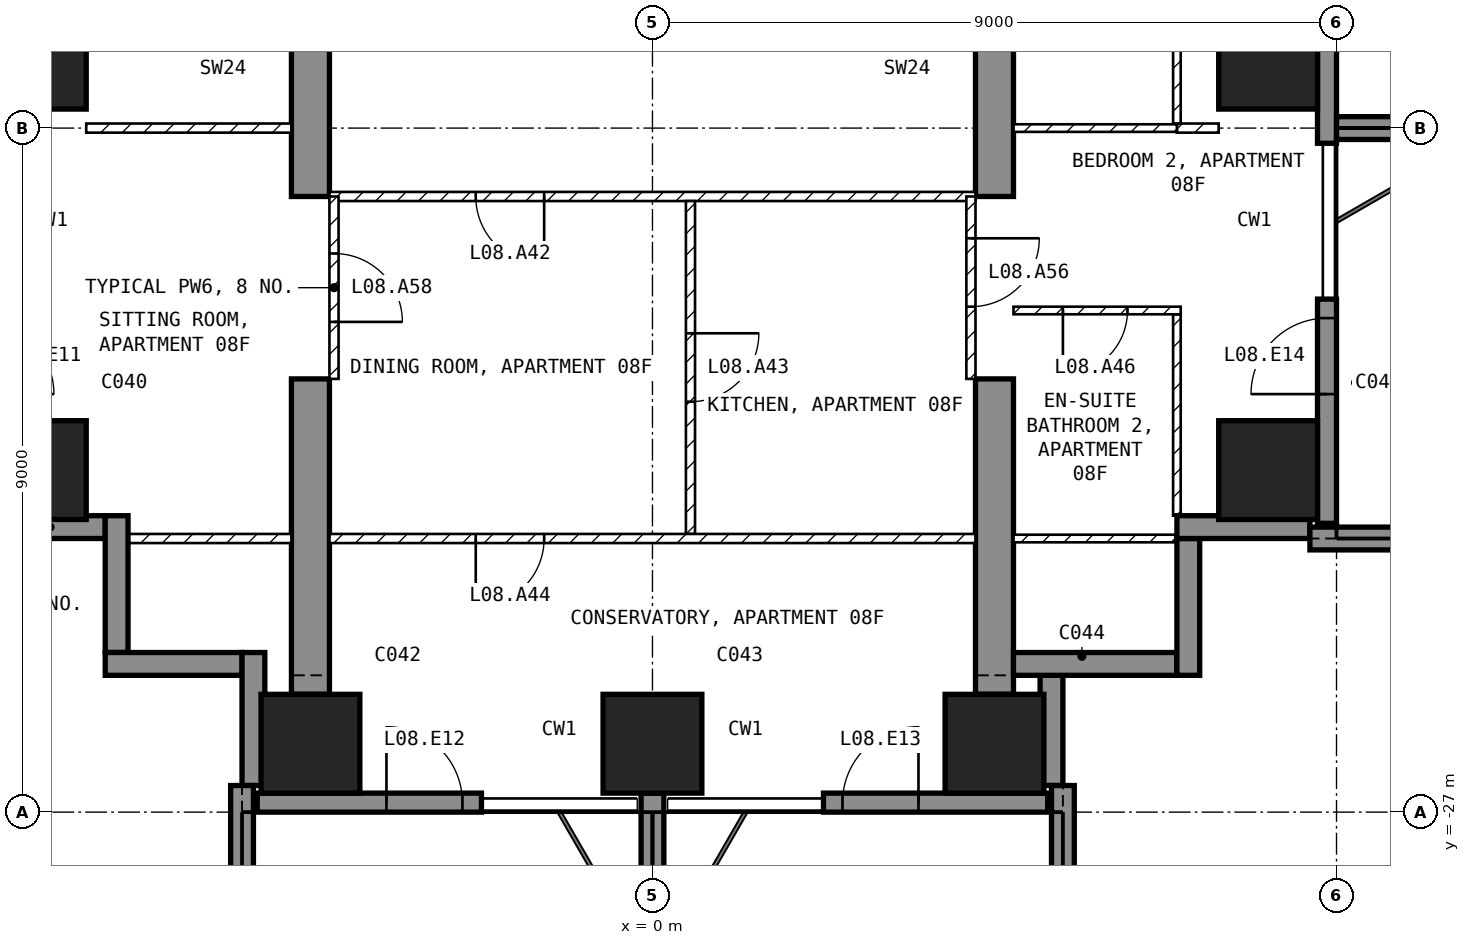
"""IFC4 building model, lengths in metres.
Left out: names, types, materials, properties, quantities, classifications, styles, units other than length and angle.
Written with IfcOpenShell. Run it as: python <this file> out.ifc"""

import sys

from ifc_helpers import new_model, si_unit, direction, frame, frame_2d, origin, origin_2d, place, context, subcontext, project, spatial, polyline, rectangle, outline, extrude, element, fill, save


model = new_model("IFC4")
c1 = context("Model", 3, precision=1e-05, world=origin(), true_north=direction((0.0, 1.0)))
c2 = subcontext(c1, "Body", "Model", "MODEL_VIEW")
j1 = project(units=[si_unit("LENGTHUNIT", "METRE"), si_unit("PLANEANGLEUNIT", "RADIAN")], contexts=[c1])
p1 = place(None, origin())
s1 = spatial("IfcSite", under=j1, at=p1, CompositionType="ELEMENT")
p2 = place(p1, origin())
s2 = spatial("IfcBuilding", under=s1, at=p2, CompositionType="ELEMENT")
p3 = place(p2, frame((0.0, 0.0, 47.0)))
s3 = spatial("IfcBuildingStorey", under=s2, at=p3, CompositionType="ELEMENT", Elevation=47.0)
for number, where, z_axis, x_axis in (
    (1, (-8.1, -22.5, -0.25), (0.0, 0.0, 1.0), (1.0, 0.0, 0.0)),
    (2, (-8.1, -17.1, -0.25), (0.0, 0.0, 1.0), (1.0, 0.0, 0.0)),
    (3, (-4.5, -26.1, -0.25), (0.0, 0.0, 1.0), (1.0, 0.0, 0.0)),
    (4, (0.0, -26.1, -0.25), (0.0, 0.0, 1.0), (1.0, 0.0, 0.0)),
    (5, (4.5, -26.1, -0.25), (0.0, 0.0, 1.0), (1.0, 0.0, 0.0)),
    (6, (8.1, -22.5, -0.25), (0.0, 0.0, 1.0), (1.0, 0.0, 0.0)),
    (7, (8.1, -17.1, -0.25), (0.0, 0.0, 1.0), (1.0, 0.0, 0.0)),
):
    element("IfcColumn", number, at=place(p3, frame(where, z_axis=z_axis, x_axis=x_axis)), inside=s3, PredefinedType="COLUMN", context=c2, shape_type="SweptSolid", body=[
        extrude(rectangle(XDim=1.3, YDim=1.3, at=origin_2d()), origin(), (0.0, 0.0, 1.0), 3.5),
    ])
for number, where, z_axis, x_axis in (
    (8, (-4.75, -25.45, -0.25), (1.0, 0.0, 0.0), (0.0, 1.0, 0.0)),
    (9, (4.25, -25.45, -0.25), (1.0, 0.0, 0.0), (0.0, 1.0, 0.0)),
):
    element("IfcWall", number, at=place(p3, frame(where, z_axis=z_axis, x_axis=x_axis)), inside=s3, PredefinedType="SHEAR", context=c2, shape_type="SweptSolid", body=[
        extrude(outline(polyline([(0.0, 0.0), (4.15, 0.0), (4.15, 2.65), (6.55, 2.65), (6.55, 0.0), (11.95, 0.0), (11.95, 2.65), (14.35, 2.65), (14.35, 0.0), (16.45, 0.0), (16.45, 3.5), (0.0, 3.5), (0.0, 0.0)])), origin(), (0.0, 0.0, 1.0), 0.5),
    ])
p4 = place(p3, frame((-5.2, -26.875, 0.0), z_axis=(0.0, 0.0, 1.0), x_axis=(1.0, 0.0, 0.0)))
e10 = element("IfcWall", 10, at=p4, inside=s3, PredefinedType="SOLIDWALL", context=c2, shape_type="SweptSolid", body=[
    extrude(rectangle(XDim=2.95, YDim=0.25, at=frame_2d((1.475, 0.0))), origin(), (0.0, 0.0, 1.0), 3.25),
])
p5 = place(p4, frame((1.7, 0.0, 0.0)))
e11 = element("IfcOpeningElement", 11, at=p5, cuts=e10, PredefinedType="OPENING", context=c2, shape_type="SweptSolid", body=[
    extrude(rectangle(XDim=1.0, YDim=2.4, at=frame_2d((0.5, 1.2))), frame((0.0, 0.135, 0.0), z_axis=(0.0, -1.0, 0.0), x_axis=(1.0, 0.0, 0.0)), (0.0, 0.0, 1.0), 0.27),
])
p6 = place(p3, frame((2.25, -26.875, 0.0), z_axis=(0.0, 0.0, 1.0), x_axis=(1.0, 0.0, 0.0)))
e12 = element("IfcWall", 12, at=p6, inside=s3, PredefinedType="SOLIDWALL", context=c2, shape_type="SweptSolid", body=[
    extrude(rectangle(XDim=2.95, YDim=0.25, at=frame_2d((1.475, 0.0))), origin(), (0.0, 0.0, 1.0), 3.25),
])
p7 = place(p6, frame((0.25, 0.0, 0.0)))
e13 = element("IfcOpeningElement", 13, at=p7, cuts=e12, PredefinedType="OPENING", context=c2, shape_type="SweptSolid", body=[
    extrude(rectangle(XDim=1.0, YDim=2.4, at=frame_2d((0.5, 1.2))), frame((0.0, 0.135, 0.0), z_axis=(0.0, -1.0, 0.0), x_axis=(1.0, 0.0, 0.0)), (0.0, 0.0, 1.0), 0.27),
])
p8 = place(p3, frame((8.875, -23.2, 0.0), z_axis=(0.0, 0.0, 1.0), x_axis=(0.0, 1.0, 0.0)))
e14 = element("IfcWall", 14, at=p8, inside=s3, PredefinedType="SOLIDWALL", context=c2, shape_type="SweptSolid", body=[
    extrude(rectangle(XDim=2.95, YDim=0.25, at=frame_2d((1.475, 0.0))), origin(), (0.0, 0.0, 1.0), 3.25),
])
p9 = place(p8, frame((1.7, 0.0, 0.0)))
e15 = element("IfcOpeningElement", 15, at=p9, cuts=e14, PredefinedType="OPENING", context=c2, shape_type="SweptSolid", body=[
    extrude(rectangle(XDim=1.0, YDim=2.4, at=frame_2d((0.5, 1.2))), frame((0.0, 0.135, 0.0), z_axis=(0.0, -1.0, 0.0), x_axis=(1.0, 0.0, 0.0)), (0.0, 0.0, 1.0), 0.27),
])
p10 = place(p3, frame((8.875, -18.2, 0.0), z_axis=(0.0, 0.0, 1.0), x_axis=(0.0, 1.0, 0.0)))
e16 = element("IfcWall", 16, at=p10, inside=s3, PredefinedType="SOLIDWALL", context=c2, shape_type="SweptSolid", body=[
    extrude(rectangle(XDim=3.55, YDim=0.25, at=frame_2d((1.775, 0.0))), origin(), (0.0, 0.0, 1.0), 3.25),
])
p11 = place(p10, frame((2.1, 0.0, 0.0)))
e17 = element("IfcOpeningElement", 17, at=p11, cuts=e16, PredefinedType="OPENING", context=c2, shape_type="SweptSolid", body=[
    extrude(rectangle(XDim=1.2, YDim=2.4, at=frame_2d((0.6, 1.2))), frame((0.0, 0.135, 0.0), z_axis=(0.0, -1.0, 0.0), x_axis=(1.0, 0.0, 0.0)), (0.0, 0.0, 1.0), 0.27),
])
p12 = place(p3, frame((5.25, -26.65, 0.0), z_axis=(0.0, 0.0, 1.0), x_axis=(0.0, 1.0, 0.0)))
e18 = element("IfcWall", 18, at=p12, inside=s3, PredefinedType="SOLIDWALL", context=c2, shape_type="SweptSolid", body=[
    extrude(rectangle(XDim=1.45, YDim=0.3, at=frame_2d((0.725, 0.0))), origin(), (0.0, 0.0, 1.0), 3.25),
])
p13 = place(p3, frame((4.75, -25.05, 0.0), z_axis=(0.0, 0.0, 1.0), x_axis=(1.0, 0.0, 0.0)))
e19 = element("IfcWall", 19, at=p13, inside=s3, PredefinedType="SOLIDWALL", context=c2, shape_type="SweptSolid", body=[
    extrude(rectangle(XDim=2.15, YDim=0.3, at=frame_2d((1.075, 0.0))), origin(), (0.0, 0.0, 1.0), 3.25),
])
p14 = place(p3, frame((7.05, -25.2, 0.0), z_axis=(0.0, 0.0, 1.0), x_axis=(0.0, 1.0, 0.0)))
e20 = element("IfcWall", 20, at=p14, inside=s3, PredefinedType="SOLIDWALL", context=c2, shape_type="SweptSolid", body=[
    extrude(rectangle(XDim=1.8, YDim=0.3, at=frame_2d((0.9, 0.0))), origin(), (0.0, 0.0, 1.0), 3.25),
])
p15 = place(p3, frame((6.9, -23.25, 0.0), z_axis=(0.0, 0.0, 1.0), x_axis=(1.0, 0.0, 0.0)))
e21 = element("IfcWall", 21, at=p15, inside=s3, PredefinedType="SOLIDWALL", context=c2, shape_type="SweptSolid", body=[
    extrude(rectangle(XDim=1.75, YDim=0.3, at=frame_2d((0.875, 0.0))), origin(), (0.0, 0.0, 1.0), 3.25),
])
p16 = place(p3, frame((-8.65, -23.25, 0.0), z_axis=(0.0, 0.0, 1.0), x_axis=(1.0, 0.0, 0.0)))
e22 = element("IfcWall", 22, at=p16, inside=s3, PredefinedType="SOLIDWALL", context=c2, shape_type="SweptSolid", body=[
    extrude(rectangle(XDim=1.45, YDim=0.3, at=frame_2d((0.725, 0.0))), origin(), (0.0, 0.0, 1.0), 3.25),
])
p17 = place(p3, frame((-7.05, -23.1, 0.0), z_axis=(0.0, 0.0, 1.0), x_axis=(0.0, -1.0, 0.0)))
e23 = element("IfcWall", 23, at=p17, inside=s3, PredefinedType="SOLIDWALL", context=c2, shape_type="SweptSolid", body=[
    extrude(rectangle(XDim=1.8, YDim=0.3, at=frame_2d((0.9, 0.0))), origin(), (0.0, 0.0, 1.0), 3.25),
])
p18 = place(p3, frame((-7.2, -25.05, 0.0), z_axis=(0.0, 0.0, 1.0), x_axis=(1.0, 0.0, 0.0)))
e24 = element("IfcWall", 24, at=p18, inside=s3, PredefinedType="SOLIDWALL", context=c2, shape_type="SweptSolid", body=[
    extrude(rectangle(XDim=1.8, YDim=0.3, at=frame_2d((0.9, 0.0))), origin(), (0.0, 0.0, 1.0), 3.25),
])
p19 = place(p3, frame((-5.25, -24.9, 0.0), z_axis=(0.0, 0.0, 1.0), x_axis=(0.0, -1.0, 0.0)))
e25 = element("IfcWall", 25, at=p19, inside=s3, PredefinedType="SOLIDWALL", context=c2, shape_type="SweptSolid", body=[
    extrude(rectangle(XDim=1.75, YDim=0.3, at=frame_2d((0.875, 0.0))), origin(), (0.0, 0.0, 1.0), 3.25),
])
p20 = place(p3, frame((-5.4, -26.65, 0.0), z_axis=(0.0, 0.0, 1.0), x_axis=(0.0, -1.0, 0.0)))
e26 = element("IfcWall", 26, at=p20, inside=s3, PredefinedType="SOLIDWALL", context=c2, shape_type="SweptSolid", body=[
    extrude(rectangle(XDim=3.05, YDim=0.3, at=frame_2d((1.525, 0.0))), origin(), (0.0, 0.0, 1.0), 3.25),
])
p21 = place(p3, frame((0.0, -26.75, 0.0), z_axis=(0.0, 0.0, 1.0), x_axis=(0.0, -1.0, 0.0)))
e27 = element("IfcWall", 27, at=p21, inside=s3, PredefinedType="SOLIDWALL", context=c2, shape_type="SweptSolid", body=[
    extrude(rectangle(XDim=2.95, YDim=0.3, at=frame_2d((1.475, 0.0))), origin(), (0.0, 0.0, 1.0), 3.25),
])
for number, where, z_axis, x_axis in (
    (28, (5.4, -26.65, 0.0), (0.0, 0.0, 1.0), (0.0, -1.0, 0.0)),
    (29, (8.65, -23.4, 0.0), (0.0, 0.0, 1.0), (1.0, 0.0, 0.0)),
):
    element("IfcWall", number, at=place(p3, frame(where, z_axis=z_axis, x_axis=x_axis)), inside=s3, PredefinedType="SOLIDWALL", context=c2, shape_type="SweptSolid", body=[
        extrude(rectangle(XDim=3.05, YDim=0.3, at=frame_2d((1.525, 0.0))), origin(), (0.0, 0.0, 1.0), 3.25),
    ])
p22 = place(p3, frame((9.0, -18.0, 0.0), z_axis=(0.0, 0.0, 1.0), x_axis=(1.0, 0.0, 0.0)))
e30 = element("IfcWall", 30, at=p22, inside=s3, PredefinedType="SOLIDWALL", context=c2, shape_type="SweptSolid", body=[
    extrude(rectangle(XDim=2.7, YDim=0.3, at=frame_2d((1.35, 0.0))), origin(), (0.0, 0.0, 1.0), 3.25),
])
p23 = place(p3, frame((4.25, -18.9, 0.0), z_axis=(0.0, 0.0, 1.0), x_axis=(-1.0, 0.0, 0.0)))
e31 = element("IfcWall", 31, at=p23, inside=s3, PredefinedType="PARTITIONING", context=c2, shape_type="SweptSolid", body=[
    extrude(rectangle(XDim=8.5, YDim=0.12, at=frame_2d((4.25, 0.0))), origin(), (0.0, 0.0, 1.0), 3.25),
])
p24 = place(p23, frame((5.675, 0.0, 0.0)))
e32 = element("IfcOpeningElement", 32, at=p24, cuts=e31, PredefinedType="OPENING", context=c2, shape_type="SweptSolid", body=[
    extrude(rectangle(XDim=0.9, YDim=2.1, at=frame_2d((0.45, 1.05))), frame((0.0, 0.07, 0.0), z_axis=(0.0, -1.0, 0.0), x_axis=(1.0, 0.0, 0.0)), (0.0, 0.0, 1.0), 0.14),
])
p25 = place(p3, frame((0.5, -18.96, 0.0), z_axis=(0.0, 0.0, 1.0), x_axis=(0.0, -1.0, 0.0)))
e33 = element("IfcWall", 33, at=p25, inside=s3, PredefinedType="PARTITIONING", context=c2, shape_type="SweptSolid", body=[
    extrude(rectangle(XDim=4.38, YDim=0.12, at=frame_2d((2.19, 0.0))), origin(), (0.0, 0.0, 1.0), 3.25),
])
p26 = place(p25, frame((1.74, 0.0, 0.0)))
e34 = element("IfcOpeningElement", 34, at=p26, cuts=e33, PredefinedType="OPENING", context=c2, shape_type="SweptSolid", body=[
    extrude(rectangle(XDim=0.9, YDim=2.1, at=frame_2d((0.45, 1.05))), frame((0.0, 0.07, 0.0), z_axis=(0.0, -1.0, 0.0), x_axis=(1.0, 0.0, 0.0)), (0.0, 0.0, 1.0), 0.14),
])
p27 = place(p3, frame((4.25, -23.4, 0.0), z_axis=(0.0, 0.0, 1.0), x_axis=(-1.0, 0.0, 0.0)))
e35 = element("IfcWall", 35, at=p27, inside=s3, PredefinedType="PARTITIONING", context=c2, shape_type="SweptSolid", body=[
    extrude(rectangle(XDim=8.5, YDim=0.12, at=frame_2d((4.25, 0.0))), origin(), (0.0, 0.0, 1.0), 3.25),
])
p28 = place(p27, frame((5.675, 0.0, 0.0)))
e36 = element("IfcOpeningElement", 36, at=p28, cuts=e35, PredefinedType="OPENING", context=c2, shape_type="SweptSolid", body=[
    extrude(rectangle(XDim=0.9, YDim=2.1, at=frame_2d((0.45, 1.05))), frame((0.0, 0.07, 0.0), z_axis=(0.0, -1.0, 0.0), x_axis=(1.0, 0.0, 0.0)), (0.0, 0.0, 1.0), 0.14),
])
p29 = place(p3, frame((6.9, -17.94, 0.0), z_axis=(0.0, 0.0, 1.0), x_axis=(0.0, 1.0, 0.0)))
e37 = element("IfcWall", 37, at=p29, inside=s3, PredefinedType="PARTITIONING", context=c2, shape_type="SweptSolid", body=[
    extrude(rectangle(XDim=3.49, YDim=0.1, at=frame_2d((1.745, 0.0))), origin(), (0.0, 0.0, 1.0), 3.25),
])
p30 = place(p3, frame((7.45, -18.0, 0.0), z_axis=(0.0, 0.0, 1.0), x_axis=(-1.0, 0.0, 0.0)))
e38 = element("IfcWall", 38, at=p30, inside=s3, PredefinedType="PARTITIONING", context=c2, shape_type="SweptSolid", body=[
    extrude(rectangle(XDim=0.55, YDim=0.12, at=frame_2d((0.275, 0.0))), origin(), (0.0, 0.0, 1.0), 3.25),
])
p31 = place(p3, frame((6.9, -18.0, 0.0), z_axis=(0.0, 0.0, 1.0), x_axis=(-1.0, 0.0, 0.0)))
e39 = element("IfcWall", 39, at=p31, inside=s3, PredefinedType="PARTITIONING", context=c2, shape_type="SweptSolid", body=[
    extrude(rectangle(XDim=2.15, YDim=0.1, at=frame_2d((1.075, 0.0))), origin(), (0.0, 0.0, 1.0), 3.25),
])
p32 = place(p3, frame((6.9, -23.1, 0.0), z_axis=(0.0, 0.0, 1.0), x_axis=(0.0, 1.0, 0.0)))
e40 = element("IfcWall", 40, at=p32, inside=s3, PredefinedType="PARTITIONING", context=c2, shape_type="SweptSolid", body=[
    extrude(rectangle(XDim=2.65, YDim=0.1, at=frame_2d((1.325, 0.0))), origin(), (0.0, 0.0, 1.0), 3.25),
])
p33 = place(p3, frame((6.95, -20.4, 0.0), z_axis=(0.0, 0.0, 1.0), x_axis=(-1.0, 0.0, 0.0)))
e41 = element("IfcWall", 41, at=p33, inside=s3, PredefinedType="PARTITIONING", context=c2, shape_type="SweptSolid", body=[
    extrude(rectangle(XDim=2.2, YDim=0.1, at=frame_2d((1.1, 0.0))), origin(), (0.0, 0.0, 1.0), 3.25),
])
p34 = place(p33, frame((0.7, 0.0, 0.0)))
e42 = element("IfcOpeningElement", 42, at=p34, cuts=e41, PredefinedType="OPENING", context=c2, shape_type="SweptSolid", body=[
    extrude(rectangle(XDim=0.85, YDim=2.1, at=frame_2d((0.425, 1.05))), frame((0.0, 0.06, 0.0), z_axis=(0.0, -1.0, 0.0), x_axis=(1.0, 0.0, 0.0)), (0.0, 0.0, 1.0), 0.12),
])
p35 = place(p3, frame((7.12, -23.4, 0.0), z_axis=(0.0, 0.0, 1.0), x_axis=(-1.0, 0.0, 0.0)))
e43 = element("IfcWall", 43, at=p35, inside=s3, PredefinedType="PARTITIONING", context=c2, shape_type="SweptSolid", body=[
    extrude(rectangle(XDim=2.37, YDim=0.1, at=frame_2d((1.185, 0.0))), origin(), (0.0, 0.0, 1.0), 3.25),
])
p36 = place(p3, frame((-4.75, -18.0, 0.0), z_axis=(0.0, 0.0, 1.0), x_axis=(-1.0, 0.0, 0.0)))
e44 = element("IfcWall", 44, at=p36, inside=s3, PredefinedType="PARTITIONING", context=c2, shape_type="SweptSolid", body=[
    extrude(rectangle(XDim=2.7, YDim=0.12, at=frame_2d((1.35, 0.0))), origin(), (0.0, 0.0, 1.0), 3.25),
])
p37 = place(p3, frame((-4.75, -23.4, 0.0), z_axis=(0.0, 0.0, 1.0), x_axis=(-1.0, 0.0, 0.0)))
e45 = element("IfcWall", 45, at=p37, inside=s3, PredefinedType="PARTITIONING", context=c2, shape_type="SweptSolid", body=[
    extrude(rectangle(XDim=2.37, YDim=0.12, at=frame_2d((1.185, 0.0))), origin(), (0.0, 0.0, 1.0), 3.25),
])
p38 = place(p3, frame((4.19, -18.9, 0.0), z_axis=(0.0, 0.0, 1.0), x_axis=(0.0, -1.0, 0.0)))
e46 = element("IfcWall", 46, at=p38, inside=s3, PredefinedType="PARTITIONING", context=c2, shape_type="SweptSolid", body=[
    extrude(rectangle(XDim=2.4, YDim=0.12, at=frame_2d((1.2, 0.0))), origin(), (0.0, 0.0, 1.0), 2.4),
])
p39 = place(p38, frame((0.55, 0.0, 0.0)))
e47 = element("IfcOpeningElement", 47, at=p39, cuts=e46, PredefinedType="OPENING", context=c2, shape_type="SweptSolid", body=[
    extrude(rectangle(XDim=0.9, YDim=2.1, at=frame_2d((0.45, 1.05))), frame((0.0, 0.07, 0.0), z_axis=(0.0, -1.0, 0.0), x_axis=(1.0, 0.0, 0.0)), (0.0, 0.0, 1.0), 0.14),
])
p40 = place(p3, frame((-4.19, -18.9, 0.0), z_axis=(0.0, 0.0, 1.0), x_axis=(0.0, -1.0, 0.0)))
e48 = element("IfcWall", 48, at=p40, inside=s3, PredefinedType="PARTITIONING", context=c2, shape_type="SweptSolid", body=[
    extrude(rectangle(XDim=2.4, YDim=0.12, at=frame_2d((1.2, 0.0))), origin(), (0.0, 0.0, 1.0), 2.4),
])
p41 = place(p40, frame((0.75, 0.0, 0.0)))
e49 = element("IfcOpeningElement", 49, at=p41, cuts=e48, PredefinedType="OPENING", context=c2, shape_type="SweptSolid", body=[
    extrude(rectangle(XDim=0.9, YDim=2.1, at=frame_2d((0.45, 1.05))), frame((0.0, 0.07, 0.0), z_axis=(0.0, -1.0, 0.0), x_axis=(1.0, 0.0, 0.0)), (0.0, 0.0, 1.0), 0.14),
])
p42 = place(p5, origin())
e50 = element("IfcDoor", 50, at=p42, inside=s3, OperationType="SINGLE_SWING_LEFT", PredefinedType="DOOR", context=c2, shape_type="SweptSolid", body=[
    extrude(rectangle(XDim=1.0, YDim=2.4, at=frame_2d((0.5, 1.2))), frame((0.0, 0.025, 0.0), z_axis=(0.0, -1.0, 0.0), x_axis=(1.0, 0.0, 0.0)), (0.0, 0.0, 1.0), 0.05),
])
fill(e11, e50)
p43 = place(p7, origin())
e51 = element("IfcDoor", 51, at=p43, inside=s3, OperationType="SINGLE_SWING_RIGHT", PredefinedType="DOOR", context=c2, shape_type="SweptSolid", body=[
    extrude(rectangle(XDim=1.0, YDim=2.4, at=frame_2d((0.5, 1.2))), frame((0.0, 0.025, 0.0), z_axis=(0.0, -1.0, 0.0), x_axis=(1.0, 0.0, 0.0)), (0.0, 0.0, 1.0), 0.05),
])
fill(e13, e51)
p44 = place(p9, origin())
e52 = element("IfcDoor", 52, at=p44, inside=s3, OperationType="SINGLE_SWING_LEFT", PredefinedType="DOOR", context=c2, shape_type="SweptSolid", body=[
    extrude(rectangle(XDim=1.0, YDim=2.4, at=frame_2d((0.5, 1.2))), frame((0.0, 0.025, 0.0), z_axis=(0.0, -1.0, 0.0), x_axis=(1.0, 0.0, 0.0)), (0.0, 0.0, 1.0), 0.05),
])
fill(e15, e52)
p45 = place(p24, origin())
e53 = element("IfcDoor", 53, at=p45, inside=s3, OperationType="SINGLE_SWING_LEFT", PredefinedType="DOOR", context=c2, shape_type="SweptSolid", body=[
    extrude(rectangle(XDim=0.9, YDim=2.1, at=frame_2d((0.45, 1.05))), frame((0.0, 0.025, 0.0), z_axis=(0.0, -1.0, 0.0), x_axis=(1.0, 0.0, 0.0)), (0.0, 0.0, 1.0), 0.05),
])
fill(e32, e53)
p46 = place(p26, origin())
e54 = element("IfcDoor", 54, at=p46, inside=s3, OperationType="SINGLE_SWING_LEFT", PredefinedType="DOOR", context=c2, shape_type="SweptSolid", body=[
    extrude(rectangle(XDim=0.9, YDim=2.1, at=frame_2d((0.45, 1.05))), frame((0.0, 0.025, 0.0), z_axis=(0.0, -1.0, 0.0), x_axis=(1.0, 0.0, 0.0)), (0.0, 0.0, 1.0), 0.05),
])
fill(e34, e54)
p47 = place(p28, origin())
e55 = element("IfcDoor", 55, at=p47, inside=s3, OperationType="SINGLE_SWING_RIGHT", PredefinedType="DOOR", context=c2, shape_type="SweptSolid", body=[
    extrude(rectangle(XDim=0.9, YDim=2.1, at=frame_2d((0.45, 1.05))), frame((0.0, 0.025, 0.0), z_axis=(0.0, -1.0, 0.0), x_axis=(1.0, 0.0, 0.0)), (0.0, 0.0, 1.0), 0.05),
])
fill(e36, e55)
p48 = place(p34, origin())
e56 = element("IfcDoor", 56, at=p48, inside=s3, OperationType="SINGLE_SWING_RIGHT", PredefinedType="DOOR", context=c2, shape_type="SweptSolid", body=[
    extrude(rectangle(XDim=0.85, YDim=2.1, at=frame_2d((0.425, 1.05))), frame((0.0, 0.025, 0.0), z_axis=(0.0, -1.0, 0.0), x_axis=(1.0, 0.0, 0.0)), (0.0, 0.0, 1.0), 0.05),
])
fill(e42, e56)
p49 = place(p39, origin())
e57 = element("IfcDoor", 57, at=p49, inside=s3, OperationType="SINGLE_SWING_LEFT", PredefinedType="DOOR", context=c2, shape_type="SweptSolid", body=[
    extrude(rectangle(XDim=0.9, YDim=2.1, at=frame_2d((0.45, 1.05))), frame((0.0, 0.025, 0.0), z_axis=(0.0, -1.0, 0.0), x_axis=(1.0, 0.0, 0.0)), (0.0, 0.0, 1.0), 0.05),
])
fill(e47, e57)
p50 = place(p41, origin())
e58 = element("IfcDoor", 58, at=p50, inside=s3, OperationType="SINGLE_SWING_RIGHT", PredefinedType="DOOR", context=c2, shape_type="SweptSolid", body=[
    extrude(rectangle(XDim=0.9, YDim=2.1, at=frame_2d((0.45, 1.05))), frame((0.0, 0.025, 0.0), z_axis=(0.0, -1.0, 0.0), x_axis=(1.0, 0.0, 0.0)), (0.0, 0.0, 1.0), 0.05),
])
fill(e49, e58)
save(model, sys.argv[1])
